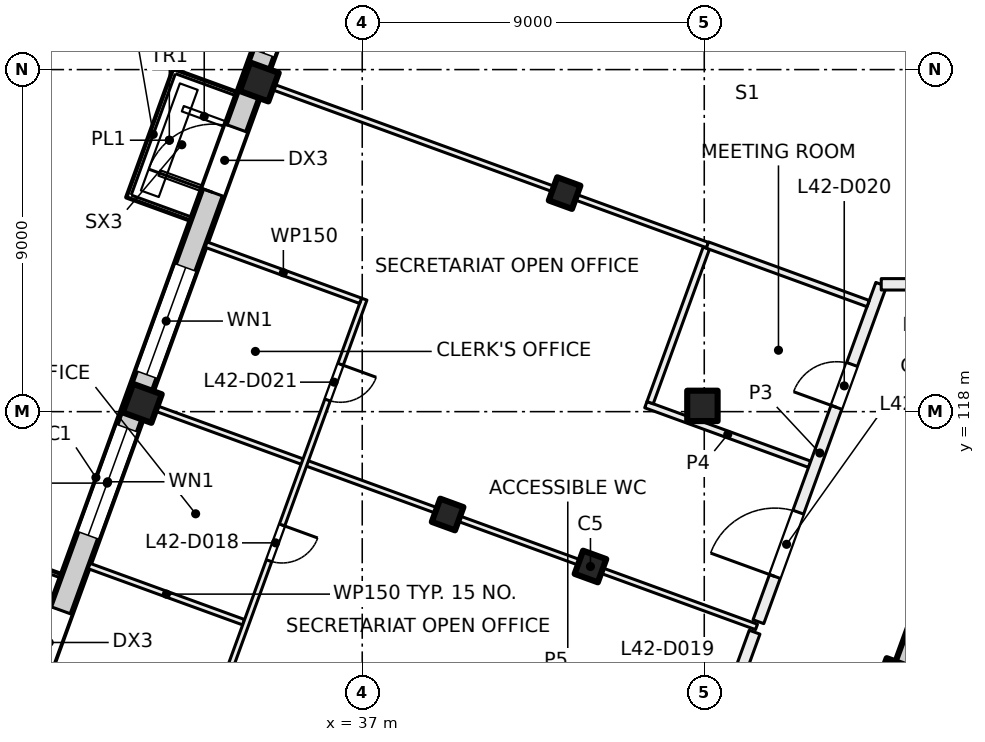
"""IFC4 building model, lengths in metres.
Left out: names, types, materials, properties, quantities, classifications, styles, units other than length and angle.
Written with IfcOpenShell. Run it as: python <this file> out.ifc"""

import sys

from ifc_helpers import new_model, si_unit, direction, frame, frame_2d, origin, origin_2d, place, context, subcontext, project, spatial, rectangle, extrude, element, fill, save


model = new_model("IFC4")
c1 = context("Model", 3, precision=1e-05, world=origin(), true_north=direction((0.0, 1.0)))
c2 = subcontext(c1, "Body", "Model", "MODEL_VIEW")
j1 = project(units=[si_unit("LENGTHUNIT", "METRE"), si_unit("PLANEANGLEUNIT", "RADIAN")], contexts=[c1])
p1 = place(None, origin())
s1 = spatial("IfcSite", under=j1, at=p1, CompositionType="ELEMENT")
p2 = place(p1, origin())
s2 = spatial("IfcBuilding", under=s1, at=p2, CompositionType="ELEMENT")
p3 = place(p2, frame((0.0, 0.0, 178.5)))
s3 = spatial("IfcBuildingStorey", under=s2, at=p3, CompositionType="ELEMENT", Elevation=178.5)
p4 = place(p3, frame((45.952, 118.152, 0.0), z_axis=(0.0, 0.0, 1.0), x_axis=(1.0, 0.0, 0.0)))
e1 = element("IfcColumn", 1, at=p4, inside=s3, PredefinedType="COLUMN", context=c2, shape_type="SweptSolid", body=[
    extrude(rectangle(XDim=0.8, YDim=0.8, at=origin_2d()), origin(), (0.0, 0.0, 1.0), 4.0),
])
for number, where, z_axis, x_axis in (
    (2, (43.006, 113.925, 0.0), (0.0, 0.0, 1.0), (-0.342, -0.94, 0.0)),
    (3, (42.325, 123.751, 0.0), (0.0, 0.0, 1.0), (-0.342, -0.94, 0.0)),
    (4, (39.247, 115.293, 0.0), (0.0, 0.0, 1.0), (-0.342, -0.94, 0.0)),
):
    element("IfcColumn", number, at=place(p3, frame(where, z_axis=z_axis, x_axis=x_axis)), inside=s3, PredefinedType="COLUMN", context=c2, shape_type="SweptSolid", body=[
        extrude(rectangle(XDim=0.65, YDim=0.65, at=origin_2d()), origin(), (0.0, 0.0, 1.0), 4.0),
    ])
for number, where, z_axis, x_axis in (
    (5, (51.04, 111.001, 0.0), (0.0, 0.0, 1.0), (-0.342, -0.94, 0.0)),
    (6, (34.291, 126.675, 0.0), (0.0, 0.0, 1.0), (-0.342, -0.94, 0.0)),
    (7, (31.212, 118.218, 0.0), (0.0, 0.0, 1.0), (-0.342, -0.94, 0.0)),
):
    element("IfcColumn", number, at=place(p3, frame(where, z_axis=z_axis, x_axis=x_axis)), inside=s3, PredefinedType="COLUMN", context=c2, shape_type="SweptSolid", body=[
        extrude(rectangle(XDim=0.8, YDim=0.8, at=origin_2d()), origin(), (0.0, 0.0, 1.0), 4.0),
    ])
p5 = place(p3, frame((52.212, 113.783, 0.0), z_axis=(0.0, 0.0, 1.0), x_axis=(-0.34202521188, -0.939690775968, 0.0)))
e8 = element("IfcWall", 8, at=p5, inside=s3, PredefinedType="SOLIDWALL", context=c2, shape_type="SweptSolid", body=[
    extrude(rectangle(XDim=21.745, YDim=0.6, at=frame_2d((10.873, 0.0))), origin(), (0.0, 0.0, 1.0), 3.625),
])
p6 = place(p5, frame((3.765, 0.0, 0.9)))
e9 = element("IfcOpeningElement", 9, at=p6, cuts=e8, PredefinedType="OPENING", context=c2, shape_type="SweptSolid", body=[
    extrude(rectangle(XDim=3.0, YDim=2.4, at=frame_2d((1.5, 1.2))), frame((0.0, 0.31, 0.0), z_axis=(0.0, -1.0, 0.0), x_axis=(1.0, 0.0, 0.0)), (0.0, 0.0, 1.0), 0.62),
])
p7 = place(p5, frame((8.865, 0.0, 0.0)))
e10 = element("IfcOpeningElement", 10, at=p7, cuts=e8, PredefinedType="OPENING", context=c2, shape_type="SweptSolid", body=[
    extrude(rectangle(XDim=1.8, YDim=2.4, at=frame_2d((0.9, 1.2))), frame((0.0, 0.31, 0.0), z_axis=(0.0, -1.0, 0.0), x_axis=(1.0, 0.0, 0.0)), (0.0, 0.0, 1.0), 0.62),
])
p8 = place(p5, frame((12.765, 0.0, 0.9)))
e11 = element("IfcOpeningElement", 11, at=p8, cuts=e8, PredefinedType="OPENING", context=c2, shape_type="SweptSolid", body=[
    extrude(rectangle(XDim=3.0, YDim=2.4, at=frame_2d((1.5, 1.2))), frame((0.0, 0.31, 0.0), z_axis=(0.0, -1.0, 0.0), x_axis=(1.0, 0.0, 0.0)), (0.0, 0.0, 1.0), 0.62),
])
p9 = place(p5, frame((17.265, 0.0, 0.9)))
e12 = element("IfcOpeningElement", 12, at=p9, cuts=e8, PredefinedType="OPENING", context=c2, shape_type="SweptSolid", body=[
    extrude(rectangle(XDim=3.0, YDim=2.4, at=frame_2d((1.5, 1.2))), frame((0.0, 0.31, 0.0), z_axis=(0.0, -1.0, 0.0), x_axis=(1.0, 0.0, 0.0)), (0.0, 0.0, 1.0), 0.62),
])
p10 = place(p3, frame((24.666, 100.669, 0.0), z_axis=(0.0, 0.0, 1.0), x_axis=(0.34201964167, 0.939692803373, 0.0)))
e13 = element("IfcWall", 13, at=p10, inside=s3, PredefinedType="SOLIDWALL", context=c2, shape_type="SweptSolid", body=[
    extrude(rectangle(XDim=32.884, YDim=0.6, at=frame_2d((16.442, 0.0))), origin(), (0.0, 0.0, 1.0), 3.625),
])
p11 = place(p10, frame((1.48, 0.0, 0.9)))
e14 = element("IfcOpeningElement", 14, at=p11, cuts=e13, PredefinedType="OPENING", context=c2, shape_type="SweptSolid", body=[
    extrude(rectangle(XDim=3.0, YDim=2.4, at=frame_2d((1.5, 1.2))), frame((0.0, 0.31, 0.0), z_axis=(0.0, -1.0, 0.0), x_axis=(1.0, 0.0, 0.0)), (0.0, 0.0, 1.0), 0.62),
])
p12 = place(p10, frame((5.98, 0.0, 0.9)))
e15 = element("IfcOpeningElement", 15, at=p12, cuts=e13, PredefinedType="OPENING", context=c2, shape_type="SweptSolid", body=[
    extrude(rectangle(XDim=3.0, YDim=2.4, at=frame_2d((1.5, 1.2))), frame((0.0, 0.31, 0.0), z_axis=(0.0, -1.0, 0.0), x_axis=(1.0, 0.0, 0.0)), (0.0, 0.0, 1.0), 0.62),
])
p13 = place(p10, frame((11.08, 0.0, 0.0)))
e16 = element("IfcOpeningElement", 16, at=p13, cuts=e13, PredefinedType="OPENING", context=c2, shape_type="SweptSolid", body=[
    extrude(rectangle(XDim=1.8, YDim=2.4, at=frame_2d((0.9, 1.2))), frame((0.0, 0.31, 0.0), z_axis=(0.0, -1.0, 0.0), x_axis=(1.0, 0.0, 0.0)), (0.0, 0.0, 1.0), 0.62),
])
p14 = place(p10, frame((14.98, 0.0, 0.9)))
e17 = element("IfcOpeningElement", 17, at=p14, cuts=e13, PredefinedType="OPENING", context=c2, shape_type="SweptSolid", body=[
    extrude(rectangle(XDim=3.0, YDim=2.4, at=frame_2d((1.5, 1.2))), frame((0.0, 0.31, 0.0), z_axis=(0.0, -1.0, 0.0), x_axis=(1.0, 0.0, 0.0)), (0.0, 0.0, 1.0), 0.62),
])
p15 = place(p10, frame((19.48, 0.0, 0.9)))
e18 = element("IfcOpeningElement", 18, at=p15, cuts=e13, PredefinedType="OPENING", context=c2, shape_type="SweptSolid", body=[
    extrude(rectangle(XDim=3.0, YDim=2.4, at=frame_2d((1.5, 1.2))), frame((0.0, 0.31, 0.0), z_axis=(0.0, -1.0, 0.0), x_axis=(1.0, 0.0, 0.0)), (0.0, 0.0, 1.0), 0.62),
])
p16 = place(p10, frame((24.58, 0.0, 0.0)))
e19 = element("IfcOpeningElement", 19, at=p16, cuts=e13, PredefinedType="OPENING", context=c2, shape_type="SweptSolid", body=[
    extrude(rectangle(XDim=1.8, YDim=2.4, at=frame_2d((0.9, 1.2))), frame((0.0, 0.31, 0.0), z_axis=(0.0, -1.0, 0.0), x_axis=(1.0, 0.0, 0.0)), (0.0, 0.0, 1.0), 0.62),
])
p17 = place(p10, frame((28.48, 0.0, 0.9)))
e20 = element("IfcOpeningElement", 20, at=p17, cuts=e13, PredefinedType="OPENING", context=c2, shape_type="SweptSolid", body=[
    extrude(rectangle(XDim=3.0, YDim=2.4, at=frame_2d((1.5, 1.2))), frame((0.0, 0.31, 0.0), z_axis=(0.0, -1.0, 0.0), x_axis=(1.0, 0.0, 0.0)), (0.0, 0.0, 1.0), 0.62),
])
p18 = place(p3, frame((29.814, 113.938, 0.0), z_axis=(0.0, 0.0, 1.0), x_axis=(0.93973078783, -0.341915262023, 0.0)))
e21 = element("IfcWall", 21, at=p18, inside=s3, PredefinedType="PARTITIONING", context=c2, shape_type="SweptSolid", body=[
    extrude(rectangle(XDim=4.326, YDim=0.15, at=frame_2d((2.163, 0.0))), origin(), (0.0, 0.0, 1.0), 3.625),
])
p19 = place(p3, frame((31.353, 118.166, 0.0), z_axis=(0.0, 0.0, 1.0), x_axis=(0.939701413127, -0.341995985602, 0.0)))
e22 = element("IfcWall", 22, at=p19, inside=s3, PredefinedType="PARTITIONING", context=c2, shape_type="SweptSolid", body=[
    extrude(rectangle(XDim=17.05, YDim=0.15, at=frame_2d((8.525, 0.0))), origin(), (0.0, 0.0, 1.0), 3.625),
])
p20 = place(p3, frame((37.053, 120.96, 0.0), z_axis=(0.0, 0.0, 1.0), x_axis=(-0.342023551531, -0.939691380293, 0.0)))
e23 = element("IfcWall", 23, at=p20, inside=s3, PredefinedType="PARTITIONING", context=c2, shape_type="SweptSolid", body=[
    extrude(rectangle(XDim=13.488, YDim=0.15, at=frame_2d((6.744, 0.0))), origin(), (0.0, 0.0, 1.0), 3.625),
])
p21 = place(p20, frame((10.791, 0.0, 0.0)))
e24 = element("IfcOpeningElement", 24, at=p21, cuts=e23, PredefinedType="OPENING", context=c2, shape_type="SweptSolid", body=[
    extrude(rectangle(XDim=1.0, YDim=2.1, at=frame_2d((0.5, 1.05))), frame((0.0, 0.085, 0.0), z_axis=(0.0, -1.0, 0.0), x_axis=(1.0, 0.0, 0.0)), (0.0, 0.0, 1.0), 0.17),
])
p22 = place(p20, frame((6.324, 0.0, 0.0)))
e25 = element("IfcOpeningElement", 25, at=p22, cuts=e23, PredefinedType="OPENING", context=c2, shape_type="SweptSolid", body=[
    extrude(rectangle(XDim=1.0, YDim=2.1, at=frame_2d((0.5, 1.05))), frame((0.0, 0.085, 0.0), z_axis=(0.0, -1.0, 0.0), x_axis=(1.0, 0.0, 0.0)), (0.0, 0.0, 1.0), 0.17),
])
p23 = place(p20, frame((1.824, 0.0, 0.0)))
e26 = element("IfcOpeningElement", 26, at=p23, cuts=e23, PredefinedType="OPENING", context=c2, shape_type="SweptSolid", body=[
    extrude(rectangle(XDim=1.0, YDim=2.1, at=frame_2d((0.5, 1.05))), frame((0.0, 0.085, 0.0), z_axis=(0.0, -1.0, 0.0), x_axis=(1.0, 0.0, 0.0)), (0.0, 0.0, 1.0), 0.17),
])
p24 = place(p3, frame((32.892, 122.395, 0.0), z_axis=(0.0, 0.0, 1.0), x_axis=(0.93973078783, -0.341915262023, 0.0)))
e27 = element("IfcWall", 27, at=p24, inside=s3, PredefinedType="PARTITIONING", context=c2, shape_type="SweptSolid", body=[
    extrude(rectangle(XDim=4.326, YDim=0.15, at=frame_2d((2.163, 0.0))), origin(), (0.0, 0.0, 1.0), 3.625),
])
p25 = place(p3, frame((47.325, 112.197, 0.0), z_axis=(0.0, 0.0, 1.0), x_axis=(-0.341976837053, -0.93970838185, 0.0)))
e28 = element("IfcWall", 28, at=p25, inside=s3, PredefinedType="PARTITIONING", context=c2, shape_type="SweptSolid", body=[
    extrude(rectangle(XDim=13.416, YDim=0.3, at=frame_2d((6.708, 0.0))), origin(), (0.0, 0.0, 1.0), 3.625),
])
p26 = place(p25, frame((8.354, 0.0, 0.0)))
e29 = element("IfcOpeningElement", 29, at=p26, cuts=e28, PredefinedType="OPENING", context=c2, shape_type="SweptSolid", body=[
    extrude(rectangle(XDim=1.0, YDim=2.1, at=frame_2d((0.5, 1.05))), frame((0.0, 0.16, 0.0), z_axis=(0.0, -1.0, 0.0), x_axis=(1.0, 0.0, 0.0)), (0.0, 0.0, 1.0), 0.32),
])
p27 = place(p25, frame((1.267, 0.0, 0.0)))
e30 = element("IfcOpeningElement", 30, at=p27, cuts=e28, PredefinedType="OPENING", context=c2, shape_type="SweptSolid", body=[
    extrude(rectangle(XDim=1.8, YDim=2.1, at=frame_2d((0.9, 1.05))), frame((0.0, 0.16, 0.0), z_axis=(0.0, -1.0, 0.0), x_axis=(1.0, 0.0, 0.0)), (0.0, 0.0, 1.0), 0.32),
])
p28 = place(p3, frame((44.463, 118.184, 0.0), z_axis=(0.0, 0.0, 1.0), x_axis=(0.939667480086, -0.342089208934, 0.0)))
e31 = element("IfcWall", 31, at=p28, inside=s3, PredefinedType="PARTITIONING", context=c2, shape_type="SweptSolid", body=[
    extrude(rectangle(XDim=4.587, YDim=0.175, at=frame_2d((2.293, 0.0))), origin(), (0.0, 0.0, 1.0), 3.625),
])
p29 = place(p3, frame((46.084, 122.383, 0.0), z_axis=(0.0, 0.0, 1.0), x_axis=(-0.939703144457, 0.341991228392, 0.0)))
e32 = element("IfcWall", 32, at=p29, inside=s3, PredefinedType="PARTITIONING", context=c2, shape_type="SweptSolid", body=[
    extrude(rectangle(XDim=12.401, YDim=0.15, at=frame_2d((6.2, 0.0))), origin(), (0.0, 0.0, 1.0), 3.625),
])
p30 = place(p3, frame((46.054, 122.301, 0.0), z_axis=(0.0, 0.0, 1.0), x_axis=(-0.341915262023, -0.93973078783, 0.0)))
e33 = element("IfcWall", 33, at=p30, inside=s3, PredefinedType="PARTITIONING", context=c2, shape_type="SweptSolid", body=[
    extrude(rectangle(XDim=4.326, YDim=0.175, at=frame_2d((2.163, 0.0))), origin(), (0.0, 0.0, 1.0), 3.625),
])
p31 = place(p3, frame((47.425, 112.473, 0.0), z_axis=(0.0, 0.0, 1.0), x_axis=(0.34204602842, 0.939683198978, 0.0)))
e34 = element("IfcWall", 34, at=p31, inside=s3, PredefinedType="PARTITIONING", context=c2, shape_type="SweptSolid", body=[
    extrude(rectangle(XDim=9.446, YDim=0.3, at=frame_2d((4.723, 0.0))), origin(), (0.0, 0.0, 1.0), 3.625),
])
p32 = place(p31, frame((6.003, 0.0, 0.0)))
e35 = element("IfcOpeningElement", 35, at=p32, cuts=e34, PredefinedType="OPENING", context=c2, shape_type="SweptSolid", body=[
    extrude(rectangle(XDim=1.2, YDim=2.1, at=frame_2d((0.6, 1.05))), frame((0.0, 0.16, 0.0), z_axis=(0.0, -1.0, 0.0), x_axis=(1.0, 0.0, 0.0)), (0.0, 0.0, 1.0), 0.32),
])
p33 = place(p31, frame((1.267, 0.0, 0.0)))
e36 = element("IfcOpeningElement", 36, at=p33, cuts=e34, PredefinedType="OPENING", context=c2, shape_type="SweptSolid", body=[
    extrude(rectangle(XDim=1.8, YDim=2.1, at=frame_2d((0.9, 1.05))), frame((0.0, 0.16, 0.0), z_axis=(0.0, -1.0, 0.0), x_axis=(1.0, 0.0, 0.0)), (0.0, 0.0, 1.0), 0.32),
])
p34 = place(p3, frame((50.312, 120.843, 0.0), z_axis=(0.0, 0.0, 1.0), x_axis=(-0.939609529273, 0.342248349154, 0.0)))
e37 = element("IfcWall", 37, at=p34, inside=s3, PredefinedType="PARTITIONING", context=c2, shape_type="SweptSolid", body=[
    extrude(rectangle(XDim=4.5, YDim=0.175, at=frame_2d((2.25, 0.0))), origin(), (0.0, 0.0, 1.0), 3.625),
])
p35 = place(p3, frame((50.657, 121.35, 0.0), z_axis=(0.0, 0.0, 1.0), x_axis=(1.0, 0.0, 0.0)))
e38 = element("IfcWall", 38, at=p35, inside=s3, PredefinedType="PARTITIONING", context=c2, shape_type="SweptSolid", body=[
    extrude(rectangle(XDim=35.096, YDim=0.3, at=frame_2d((17.548, 0.0))), origin(), (0.0, 0.0, 1.0), 3.625),
])
p36 = place(p35, frame((26.243, 0.0, 0.0)))
e39 = element("IfcOpeningElement", 39, at=p36, cuts=e38, PredefinedType="OPENING", context=c2, shape_type="SweptSolid", body=[
    extrude(rectangle(XDim=1.2, YDim=2.1, at=frame_2d((0.6, 1.05))), frame((0.0, 0.16, 0.0), z_axis=(0.0, -1.0, 0.0), x_axis=(1.0, 0.0, 0.0)), (0.0, 0.0, 1.0), 0.32),
])
p37 = place(p35, frame((22.593, 0.0, 0.0)))
e40 = element("IfcOpeningElement", 40, at=p37, cuts=e38, PredefinedType="OPENING", context=c2, shape_type="SweptSolid", body=[
    extrude(rectangle(XDim=1.0, YDim=2.1, at=frame_2d((0.5, 1.05))), frame((0.0, 0.16, 0.0), z_axis=(0.0, -1.0, 0.0), x_axis=(1.0, 0.0, 0.0)), (0.0, 0.0, 1.0), 0.32),
])
p38 = place(p35, frame((31.193, 0.0, 0.0)))
e41 = element("IfcOpeningElement", 41, at=p38, cuts=e38, PredefinedType="OPENING", context=c2, shape_type="SweptSolid", body=[
    extrude(rectangle(XDim=1.8, YDim=2.1, at=frame_2d((0.9, 1.05))), frame((0.0, 0.16, 0.0), z_axis=(0.0, -1.0, 0.0), x_axis=(1.0, 0.0, 0.0)), (0.0, 0.0, 1.0), 0.32),
])
p39 = place(p35, frame((18.743, 0.0, 0.0)))
e42 = element("IfcOpeningElement", 42, at=p39, cuts=e38, PredefinedType="OPENING", context=c2, shape_type="SweptSolid", body=[
    extrude(rectangle(XDim=1.2, YDim=2.1, at=frame_2d((0.6, 1.05))), frame((0.0, 0.16, 0.0), z_axis=(0.0, -1.0, 0.0), x_axis=(1.0, 0.0, 0.0)), (0.0, 0.0, 1.0), 0.32),
])
p40 = place(p35, frame((14.243, 0.0, 0.0)))
e43 = element("IfcOpeningElement", 43, at=p40, cuts=e38, PredefinedType="OPENING", context=c2, shape_type="SweptSolid", body=[
    extrude(rectangle(XDim=1.2, YDim=2.1, at=frame_2d((0.6, 1.05))), frame((0.0, 0.16, 0.0), z_axis=(0.0, -1.0, 0.0), x_axis=(1.0, 0.0, 0.0)), (0.0, 0.0, 1.0), 0.32),
])
p41 = place(p35, frame((10.693, 0.0, 0.0)))
e44 = element("IfcOpeningElement", 44, at=p41, cuts=e38, PredefinedType="OPENING", context=c2, shape_type="SweptSolid", body=[
    extrude(rectangle(XDim=0.8, YDim=2.1, at=frame_2d((0.4, 1.05))), frame((0.0, 0.16, 0.0), z_axis=(0.0, -1.0, 0.0), x_axis=(1.0, 0.0, 0.0)), (0.0, 0.0, 1.0), 0.32),
])
p42 = place(p35, frame((5.693, 0.0, 0.0)))
e45 = element("IfcOpeningElement", 45, at=p42, cuts=e38, PredefinedType="OPENING", context=c2, shape_type="SweptSolid", body=[
    extrude(rectangle(XDim=1.8, YDim=2.1, at=frame_2d((0.9, 1.05))), frame((0.0, 0.16, 0.0), z_axis=(0.0, -1.0, 0.0), x_axis=(1.0, 0.0, 0.0)), (0.0, 0.0, 1.0), 0.32),
])
p43 = place(p35, frame((0.896, 0.0, 0.0)))
e46 = element("IfcOpeningElement", 46, at=p43, cuts=e38, PredefinedType="OPENING", context=c2, shape_type="SweptSolid", body=[
    extrude(rectangle(XDim=1.8, YDim=2.1, at=frame_2d((0.9, 1.05))), frame((0.0, 0.16, 0.0), z_axis=(0.0, -1.0, 0.0), x_axis=(1.0, 0.0, 0.0)), (0.0, 0.0, 1.0), 0.32),
])
p44 = place(p13, origin())
e47 = element("IfcDoor", 47, at=p44, inside=s3, OperationType="DOUBLE_DOOR_SINGLE_SWING", PredefinedType="DOOR", context=c2, shape_type="SweptSolid", body=[
    extrude(rectangle(XDim=1.8, YDim=2.4, at=frame_2d((0.9, 1.2))), frame((0.0, 0.025, 0.0), z_axis=(0.0, -1.0, 0.0), x_axis=(1.0, 0.0, 0.0)), (0.0, 0.0, 1.0), 0.05),
])
fill(e16, e47)
p45 = place(p14, origin())
e48 = element("IfcWindow", 48, at=p45, inside=s3, PartitioningType="SINGLE_PANEL", PredefinedType="WINDOW", context=c2, shape_type="SweptSolid", body=[
    extrude(rectangle(XDim=3.0, YDim=2.4, at=frame_2d((1.5, 1.2))), frame((0.0, 0.03, 0.0), z_axis=(0.0, -1.0, 0.0), x_axis=(1.0, 0.0, 0.0)), (0.0, 0.0, 1.0), 0.06),
])
fill(e17, e48)
p46 = place(p15, origin())
e49 = element("IfcWindow", 49, at=p46, inside=s3, PartitioningType="SINGLE_PANEL", PredefinedType="WINDOW", context=c2, shape_type="SweptSolid", body=[
    extrude(rectangle(XDim=3.0, YDim=2.4, at=frame_2d((1.5, 1.2))), frame((0.0, 0.03, 0.0), z_axis=(0.0, -1.0, 0.0), x_axis=(1.0, 0.0, 0.0)), (0.0, 0.0, 1.0), 0.06),
])
fill(e18, e49)
p47 = place(p16, origin())
e50 = element("IfcDoor", 50, at=p47, inside=s3, OperationType="DOUBLE_DOOR_SINGLE_SWING", PredefinedType="DOOR", context=c2, shape_type="SweptSolid", body=[
    extrude(rectangle(XDim=1.8, YDim=2.4, at=frame_2d((0.9, 1.2))), frame((0.0, 0.025, 0.0), z_axis=(0.0, -1.0, 0.0), x_axis=(1.0, 0.0, 0.0)), (0.0, 0.0, 1.0), 0.05),
])
fill(e19, e50)
p48 = place(p17, origin())
e51 = element("IfcWindow", 51, at=p48, inside=s3, PartitioningType="SINGLE_PANEL", PredefinedType="WINDOW", context=c2, shape_type="SweptSolid", body=[
    extrude(rectangle(XDim=3.0, YDim=2.4, at=frame_2d((1.5, 1.2))), frame((0.0, 0.03, 0.0), z_axis=(0.0, -1.0, 0.0), x_axis=(1.0, 0.0, 0.0)), (0.0, 0.0, 1.0), 0.06),
])
fill(e20, e51)
p49 = place(p22, origin())
e52 = element("IfcDoor", 52, at=p49, inside=s3, OperationType="SINGLE_SWING_RIGHT", PredefinedType="DOOR", context=c2, shape_type="SweptSolid", body=[
    extrude(rectangle(XDim=1.0, YDim=2.1, at=frame_2d((0.5, 1.05))), frame((0.0, 0.025, 0.0), z_axis=(0.0, -1.0, 0.0), x_axis=(1.0, 0.0, 0.0)), (0.0, 0.0, 1.0), 0.05),
])
fill(e25, e52)
p50 = place(p32, origin())
e53 = element("IfcDoor", 53, at=p50, inside=s3, OperationType="DOUBLE_DOOR_SINGLE_SWING", PredefinedType="DOOR", context=c2, shape_type="SweptSolid", body=[
    extrude(rectangle(XDim=1.2, YDim=2.1, at=frame_2d((0.6, 1.05))), frame((0.0, 0.025, 0.0), z_axis=(0.0, -1.0, 0.0), x_axis=(1.0, 0.0, 0.0)), (0.0, 0.0, 1.0), 0.05),
])
fill(e35, e53)
p51 = place(p23, origin())
e54 = element("IfcDoor", 54, at=p51, inside=s3, OperationType="SINGLE_SWING_LEFT", PredefinedType="DOOR", context=c2, shape_type="SweptSolid", body=[
    extrude(rectangle(XDim=1.0, YDim=2.1, at=frame_2d((0.5, 1.05))), frame((0.0, 0.025, 0.0), z_axis=(0.0, -1.0, 0.0), x_axis=(1.0, 0.0, 0.0)), (0.0, 0.0, 1.0), 0.05),
])
fill(e26, e54)
p52 = place(p33, origin())
e55 = element("IfcDoor", 55, at=p52, inside=s3, OperationType="DOUBLE_DOOR_SINGLE_SWING", PredefinedType="DOOR", context=c2, shape_type="SweptSolid", body=[
    extrude(rectangle(XDim=1.8, YDim=2.1, at=frame_2d((0.9, 1.05))), frame((0.0, 0.025, 0.0), z_axis=(0.0, -1.0, 0.0), x_axis=(1.0, 0.0, 0.0)), (0.0, 0.0, 1.0), 0.05),
])
fill(e36, e55)
save(model, sys.argv[1])
